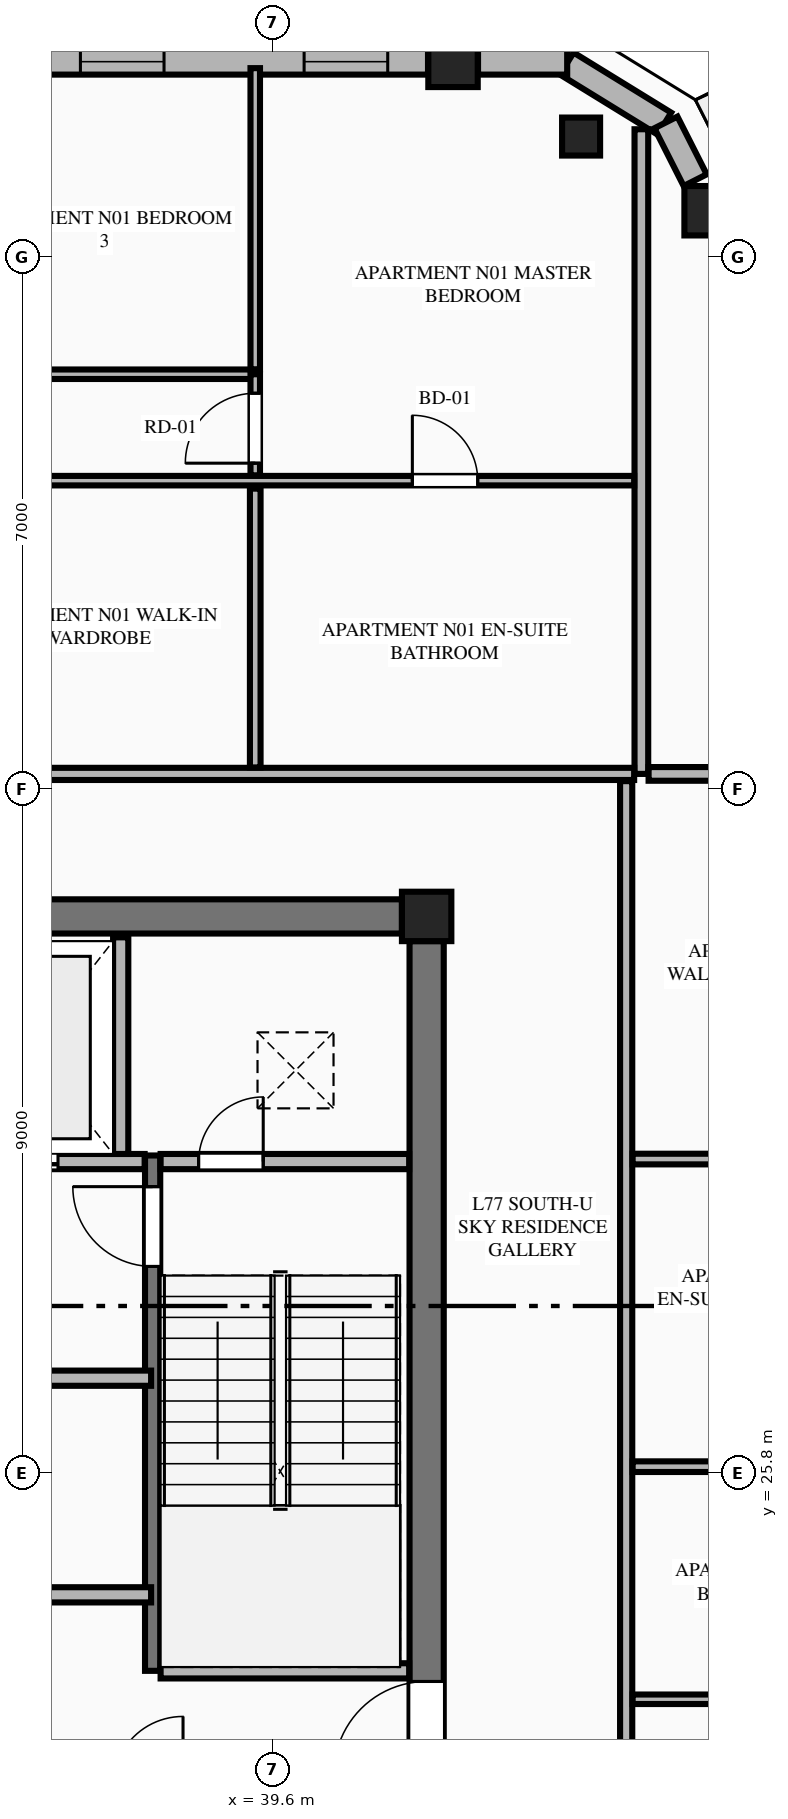
"""IFC4 building model, lengths in metres.
Left out: names, types, materials, properties, quantities, classifications, styles, units other than length and angle.
Written with IfcOpenShell. Run it as: python <this file> out.ifc"""

import sys

from ifc_helpers import new_model, si_unit, direction, frame, frame_2d, origin, origin_2d, place, context, subcontext, project, spatial, rectangle, extrude, element, fill, save


model = new_model("IFC4")
c1 = context("Model", 3, precision=1e-05, world=origin(), true_north=direction((0.0, 1.0)))
c2 = subcontext(c1, "Body", "Model", "MODEL_VIEW")
j1 = project(units=[si_unit("LENGTHUNIT", "METRE"), si_unit("PLANEANGLEUNIT", "RADIAN")], contexts=[c1])
p1 = place(None, origin())
s1 = spatial("IfcSite", under=j1, at=p1, CompositionType="ELEMENT")
p2 = place(p1, origin())
s2 = spatial("IfcBuilding", under=s1, at=p2, CompositionType="ELEMENT")
p3 = place(p2, frame((0.0, 0.0, 291.5)))
s3 = spatial("IfcBuildingStorey", under=s2, at=p3, CompositionType="ELEMENT", Elevation=291.5)
p4 = place(p3, frame((41.625, 33.125, 0.0), z_axis=(0.0, 0.0, 1.0), x_axis=(1.0, 0.0, 0.0)))
e1 = element("IfcColumn", 1, at=p4, inside=s3, PredefinedType="COLUMN", context=c2, shape_type="SweptSolid", body=[
    extrude(rectangle(XDim=0.65, YDim=0.65, at=origin_2d()), origin(), (0.0, 0.0, 1.0), 4.0),
])
p5 = place(p3, frame((23.5, 33.125, 0.0), z_axis=(0.0, 0.0, 1.0), x_axis=(1.0, 0.0, 0.0)))
e2 = element("IfcWall", 2, at=p5, inside=s3, PredefinedType="SHEAR", context=c2, shape_type="SweptSolid", body=[
    extrude(rectangle(XDim=17.8, YDim=0.45, at=frame_2d((8.9, 0.0))), origin(), (0.0, 0.0, 1.0), 3.8),
])
p6 = place(p3, frame((41.625, 19.0, 0.0), z_axis=(0.0, 0.0, 1.0), x_axis=(0.0, 1.0, 0.0)))
e3 = element("IfcWall", 3, at=p6, inside=s3, PredefinedType="SHEAR", context=c2, shape_type="SweptSolid", body=[
    extrude(rectangle(XDim=13.8, YDim=0.45, at=frame_2d((6.9, 0.0))), origin(), (0.0, 0.0, 1.0), 3.8),
])
p7 = place(p6, frame((2.84, 0.0, 0.0)))
e4 = element("IfcOpeningElement", 4, at=p7, cuts=e3, PredefinedType="OPENING", context=c2, shape_type="SweptSolid", body=[
    extrude(rectangle(XDim=1.22, YDim=2.25, at=frame_2d((0.61, 1.125))), frame((0.0, 0.235, 0.0), z_axis=(0.0, -1.0, 0.0), x_axis=(1.0, 0.0, 0.0)), (0.0, 0.0, 1.0), 0.47),
])
for number, where, z_axis, x_axis in (
    (5, (45.341, 42.409, 0.0), (0.0, 0.0, 1.0), (1.0, 0.0, 0.0)),
    (6, (41.972, 44.361, 0.0), (0.0, 0.0, 1.0), (1.0, 0.0, 0.0)),
):
    element("IfcColumn", number, at=place(p3, frame(where, z_axis=z_axis, x_axis=x_axis)), inside=s3, PredefinedType="COLUMN", context=c2, shape_type="SweptSolid", body=[
        extrude(rectangle(XDim=0.65, YDim=0.65, at=origin_2d()), origin(), (0.0, 0.0, 1.0), 4.0),
    ])
p8 = place(p3, frame((43.657, 43.385, 0.0), z_axis=(0.0, 0.0, 1.0), x_axis=(-0.865256437757, 0.501329529272, 0.0)))
e7 = element("IfcColumn", 7, at=p8, inside=s3, PredefinedType="PILASTER", context=c2, shape_type="SweptSolid", body=[
    extrude(rectangle(XDim=0.5, YDim=0.35, at=origin_2d()), origin(), (0.0, 0.0, 1.0), 4.0),
])
p9 = place(p3, frame((38.02, 23.2, 0.0), z_axis=(0.0, 0.0, 1.0), x_axis=(0.0, 1.0, 0.0)))
e8 = element("IfcWall", 8, at=p9, inside=s3, PredefinedType="SHEAR", context=c2, shape_type="SweptSolid", body=[
    extrude(rectangle(XDim=6.78, YDim=0.2, at=frame_2d((3.39, 0.0))), origin(), (0.0, 0.0, 1.0), 4.0),
])
p10 = place(p9, frame((5.32, 0.0, 0.0)))
e9 = element("IfcOpeningElement", 9, at=p10, cuts=e8, PredefinedType="OPENING", context=c2, shape_type="SweptSolid", body=[
    extrude(rectangle(XDim=1.05, YDim=2.15, at=frame_2d((0.525, 1.075))), frame((0.0, 0.11, 0.0), z_axis=(0.0, -1.0, 0.0), x_axis=(1.0, 0.0, 0.0)), (0.0, 0.0, 1.0), 0.22),
])
p11 = place(p3, frame((38.125, 23.2, 0.0), z_axis=(0.0, 0.0, 1.0), x_axis=(1.0, 0.0, 0.0)))
e10 = element("IfcWall", 10, at=p11, inside=s3, PredefinedType="PLUMBINGWALL", context=c2, shape_type="SweptSolid", body=[
    extrude(rectangle(XDim=3.27, YDim=0.2, at=frame_2d((1.635, 0.0))), origin(), (0.0, 0.0, 1.0), 3.8),
])
p12 = place(p3, frame((34.9, 29.9, 0.0), z_axis=(0.0, 0.0, 1.0), x_axis=(1.0, 0.0, 0.0)))
e11 = element("IfcWall", 11, at=p12, inside=s3, PredefinedType="PLUMBINGWALL", context=c2, shape_type="SweptSolid", body=[
    extrude(rectangle(XDim=3.015, YDim=0.2, at=frame_2d((1.508, 0.0))), origin(), (0.0, 0.0, 1.0), 3.8),
])
p13 = place(p12, frame((0.725, 0.0, 0.0)))
e12 = element("IfcOpeningElement", 12, at=p13, cuts=e11, PredefinedType="OPENING", context=c2, shape_type="SweptSolid", body=[
    extrude(rectangle(XDim=1.15, YDim=2.2, at=frame_2d((0.575, 1.1))), frame((0.0, 0.11, 0.0), z_axis=(0.0, -1.0, 0.0), x_axis=(1.0, 0.0, 0.0)), (0.0, 0.0, 1.0), 0.22),
])
p14 = place(p3, frame((38.125, 29.9, 0.0), z_axis=(0.0, 0.0, 1.0), x_axis=(1.0, 0.0, 0.0)))
e13 = element("IfcWall", 13, at=p14, inside=s3, PredefinedType="PLUMBINGWALL", context=c2, shape_type="SweptSolid", body=[
    extrude(rectangle(XDim=3.27, YDim=0.2, at=frame_2d((1.635, 0.0))), origin(), (0.0, 0.0, 1.0), 3.8),
])
p15 = place(p14, frame((0.5, 0.0, 0.0)))
e14 = element("IfcOpeningElement", 14, at=p15, cuts=e13, PredefinedType="OPENING", context=c2, shape_type="SweptSolid", body=[
    extrude(rectangle(XDim=0.85, YDim=2.05, at=frame_2d((0.425, 1.025))), frame((0.0, 0.11, 0.0), z_axis=(0.0, -1.0, 0.0), x_axis=(1.0, 0.0, 0.0)), (0.0, 0.0, 1.0), 0.22),
])
p16 = place(p3, frame((37.6, 30.0, 0.0), z_axis=(0.0, 0.0, 1.0), x_axis=(0.0, 1.0, 0.0)))
e15 = element("IfcWall", 15, at=p16, inside=s3, PredefinedType="PLUMBINGWALL", context=c2, shape_type="SweptSolid", body=[
    extrude(rectangle(XDim=2.85, YDim=0.2, at=frame_2d((1.425, 0.0))), origin(), (0.0, 0.0, 1.0), 3.8),
])
p17 = place(p3, frame((34.8, 27.05, 0.0), z_axis=(0.0, 0.0, 1.0), x_axis=(1.0, 0.0, 0.0)))
e16 = element("IfcWall", 16, at=p17, inside=s3, PredefinedType="PLUMBINGWALL", context=c2, shape_type="SweptSolid", body=[
    extrude(rectangle(XDim=3.2, YDim=0.2, at=frame_2d((1.6, 0.0))), origin(), (0.0, 0.0, 1.0), 3.8),
])
p18 = place(p3, frame((31.2, 24.2, 0.0), z_axis=(0.0, 0.0, 1.0), x_axis=(1.0, 0.0, 0.0)))
e17 = element("IfcWall", 17, at=p18, inside=s3, PredefinedType="PLUMBINGWALL", context=c2, shape_type="SweptSolid", body=[
    extrude(rectangle(XDim=6.8, YDim=0.2, at=frame_2d((3.4, 0.0))), origin(), (0.0, 0.0, 1.0), 3.8),
])
p19 = place(p18, frame((0.65, 0.0, 0.0)))
e18 = element("IfcOpeningElement", 18, at=p19, cuts=e17, PredefinedType="OPENING", context=c2, shape_type="SweptSolid", body=[
    extrude(rectangle(XDim=1.1, YDim=2.2, at=frame_2d((0.55, 1.1))), frame((0.0, 0.11, 0.0), z_axis=(0.0, -1.0, 0.0), x_axis=(1.0, 0.0, 0.0)), (0.0, 0.0, 1.0), 0.22),
])
p20 = place(p18, frame((3.8, 0.0, 0.0)))
e19 = element("IfcOpeningElement", 19, at=p20, cuts=e17, PredefinedType="OPENING", context=c2, shape_type="SweptSolid", body=[
    extrude(rectangle(XDim=0.92, YDim=2.15, at=frame_2d((0.46, 1.075))), frame((0.0, 0.11, 0.0), z_axis=(0.0, -1.0, 0.0), x_axis=(1.0, 0.0, 0.0)), (0.0, 0.0, 1.0), 0.22),
])
p21 = place(p3, frame((44.753, 43.555, 0.0), z_axis=(0.0, 0.0, 1.0), x_axis=(-0.851680557619, 0.52406128246, 0.0)))
e20 = element("IfcWall", 20, at=p21, inside=s3, PredefinedType="STANDARD", context=c2, shape_type="SweptSolid", body=[
    extrude(rectangle(XDim=1.508, YDim=0.34, at=frame_2d((0.754, 0.0))), origin(), (0.0, 0.0, 1.0), 3.8),
])
p22 = place(p3, frame((45.158, 42.811, 0.0), z_axis=(0.0, 0.0, 1.0), x_axis=(-0.451907025977, 0.8920650424, 0.0)))
e21 = element("IfcWall", 21, at=p22, inside=s3, PredefinedType="STANDARD", context=c2, shape_type="SweptSolid", body=[
    extrude(rectangle(XDim=0.852, YDim=0.34, at=frame_2d((0.426, 0.0))), origin(), (0.0, 0.0, 1.0), 3.8),
])
p23 = place(p3, frame((43.474, 44.37, 0.0), z_axis=(0.0, 0.0, 1.0), x_axis=(-1.0, 0.0, 0.0)))
e22 = element("IfcWall", 22, at=p23, inside=s3, PredefinedType="STANDARD", context=c2, shape_type="SweptSolid", body=[
    extrude(rectangle(XDim=1.173, YDim=0.34, at=frame_2d((0.586, 0.0))), origin(), (0.0, 0.0, 1.0), 3.8),
])
p24 = place(p3, frame((41.643, 44.37, 0.0), z_axis=(0.0, 0.0, 1.0), x_axis=(-1.0, 0.0, 0.0)))
e23 = element("IfcWall", 23, at=p24, inside=s3, PredefinedType="STANDARD", context=c2, shape_type="SweptSolid", body=[
    extrude(rectangle(XDim=5.66, YDim=0.34, at=frame_2d((2.83, 0.0))), origin(), (0.0, 0.0, 1.0), 2.99),
])
p25 = place(p24, frame((0.53, 0.0, 0.75)))
e24 = element("IfcOpeningElement", 24, at=p25, cuts=e23, PredefinedType="OPENING", context=c2, shape_type="SweptSolid", body=[
    extrude(rectangle(XDim=1.1, YDim=2.0, at=frame_2d((0.55, 1.0))), frame((0.0, 0.18, 0.0), z_axis=(0.0, -1.0, 0.0), x_axis=(1.0, 0.0, 0.0)), (0.0, 0.0, 1.0), 0.36),
])
p26 = place(p24, frame((3.473, 0.0, 0.75)))
e25 = element("IfcOpeningElement", 25, at=p26, cuts=e23, PredefinedType="OPENING", context=c2, shape_type="SweptSolid", body=[
    extrude(rectangle(XDim=1.1, YDim=2.0, at=frame_2d((0.55, 1.0))), frame((0.0, 0.18, 0.0), z_axis=(0.0, -1.0, 0.0), x_axis=(1.0, 0.0, 0.0)), (0.0, 0.0, 1.0), 0.36),
])
p27 = place(p3, frame((44.45, 35.0, 0.0), z_axis=(0.0, 0.0, 1.0), x_axis=(0.0, 1.0, 0.0)))
e26 = element("IfcWall", 26, at=p27, inside=s3, PredefinedType="PARTITIONING", context=c2, shape_type="SweptSolid", body=[
    extrude(rectangle(XDim=8.481, YDim=0.18, at=frame_2d((4.24, 0.0))), origin(), (0.0, 0.0, 1.0), 3.8),
])
p28 = place(p3, frame((20.445, 35.0, 0.0), z_axis=(0.0, 0.0, 1.0), x_axis=(1.0, 0.0, 0.0)))
e27 = element("IfcWall", 27, at=p28, inside=s3, PredefinedType="PARTITIONING", context=c2, shape_type="SweptSolid", body=[
    extrude(rectangle(XDim=23.91, YDim=0.16, at=frame_2d((11.955, 0.0))), origin(), (0.0, 0.0, 1.0), 3.8),
])
p29 = place(p28, frame((0.405, 0.0, 0.0)))
e28 = element("IfcOpeningElement", 28, at=p29, cuts=e27, PredefinedType="OPENING", context=c2, shape_type="SweptSolid", body=[
    extrude(rectangle(XDim=1.35, YDim=2.35, at=frame_2d((0.675, 1.175))), frame((0.0, 0.09, 0.0), z_axis=(0.0, -1.0, 0.0), x_axis=(1.0, 0.0, 0.0)), (0.0, 0.0, 1.0), 0.18),
])
p30 = place(p3, frame((34.588, 38.858, 0.0), z_axis=(0.0, 0.0, 1.0), x_axis=(1.0, 0.0, 0.0)))
e29 = element("IfcWall", 29, at=p30, inside=s3, PredefinedType="PARTITIONING", context=c2, shape_type="SweptSolid", body=[
    extrude(rectangle(XDim=9.767, YDim=0.125, at=frame_2d((4.884, 0.0))), origin(), (0.0, 0.0, 1.0), 3.8),
])
p31 = place(p30, frame((6.849, 0.0, 0.0)))
e30 = element("IfcOpeningElement", 30, at=p31, cuts=e29, PredefinedType="OPENING", context=c2, shape_type="SweptSolid", body=[
    extrude(rectangle(XDim=0.86, YDim=2.1, at=frame_2d((0.43, 1.05))), frame((0.0, 0.073, 0.0), z_axis=(0.0, -1.0, 0.0), x_axis=(1.0, 0.0, 0.0)), (0.0, 0.0, 1.0), 0.145),
])
p32 = place(p30, frame((0.3, 0.0, 0.0)))
e31 = element("IfcOpeningElement", 31, at=p32, cuts=e29, PredefinedType="OPENING", context=c2, shape_type="SweptSolid", body=[
    extrude(rectangle(XDim=0.88, YDim=2.15, at=frame_2d((0.44, 1.075))), frame((0.0, 0.073, 0.0), z_axis=(0.0, -1.0, 0.0), x_axis=(1.0, 0.0, 0.0)), (0.0, 0.0, 1.0), 0.145),
])
p33 = place(p3, frame((29.508, 40.258, 0.0), z_axis=(0.0, 0.0, 1.0), x_axis=(1.0, 0.0, 0.0)))
e32 = element("IfcWall", 32, at=p33, inside=s3, PredefinedType="PARTITIONING", context=c2, shape_type="SweptSolid", body=[
    extrude(rectangle(XDim=9.862, YDim=0.125, at=frame_2d((4.931, 0.0))), origin(), (0.0, 0.0, 1.0), 3.487),
])
p34 = place(p33, frame((0.35, 0.0, 0.0)))
e33 = element("IfcOpeningElement", 33, at=p34, cuts=e32, PredefinedType="OPENING", context=c2, shape_type="SweptSolid", body=[
    extrude(rectangle(XDim=0.92, YDim=2.15, at=frame_2d((0.46, 1.075))), frame((0.0, 0.073, 0.0), z_axis=(0.0, -1.0, 0.0), x_axis=(1.0, 0.0, 0.0)), (0.0, 0.0, 1.0), 0.145),
])
p35 = place(p33, frame((5.43, 0.0, 0.0)))
e34 = element("IfcOpeningElement", 34, at=p35, cuts=e32, PredefinedType="OPENING", context=c2, shape_type="SweptSolid", body=[
    extrude(rectangle(XDim=0.92, YDim=2.15, at=frame_2d((0.46, 1.075))), frame((0.0, 0.073, 0.0), z_axis=(0.0, -1.0, 0.0), x_axis=(1.0, 0.0, 0.0)), (0.0, 0.0, 1.0), 0.145),
])
p36 = place(p3, frame((39.37, 38.928, 0.0), z_axis=(0.0, 0.0, 1.0), x_axis=(0.0, 1.0, 0.0)))
e35 = element("IfcWall", 35, at=p36, inside=s3, PredefinedType="PARTITIONING", context=c2, shape_type="SweptSolid", body=[
    extrude(rectangle(XDim=1.33, YDim=0.125, at=frame_2d((0.665, 0.0))), origin(), (0.0, 0.0, 1.0), 3.8),
])
p37 = place(p36, frame((0.16, 0.0, 0.0)))
e36 = element("IfcOpeningElement", 36, at=p37, cuts=e35, PredefinedType="OPENING", context=c2, shape_type="SweptSolid", body=[
    extrude(rectangle(XDim=0.92, YDim=2.15, at=frame_2d((0.46, 1.075))), frame((0.0, 0.073, 0.0), z_axis=(0.0, -1.0, 0.0), x_axis=(1.0, 0.0, 0.0)), (0.0, 0.0, 1.0), 0.145),
])
p38 = place(p3, frame((39.37, 40.323, 0.0), z_axis=(0.0, 0.0, 1.0), x_axis=(0.0, 1.0, 0.0)))
e37 = element("IfcWall", 37, at=p38, inside=s3, PredefinedType="PARTITIONING", context=c2, shape_type="SweptSolid", body=[
    extrude(rectangle(XDim=3.962, YDim=0.125, at=frame_2d((1.981, 0.0))), origin(), (0.0, 0.0, 1.0), 3.8),
])
p39 = place(p3, frame((39.37, 35.085, 0.0), z_axis=(0.0, 0.0, 1.0), x_axis=(0.0, 1.0, 0.0)))
e38 = element("IfcWall", 38, at=p39, inside=s3, PredefinedType="PLUMBINGWALL", context=c2, shape_type="SweptSolid", body=[
    extrude(rectangle(XDim=3.668, YDim=0.14, at=frame_2d((1.834, 0.0))), origin(), (0.0, 0.0, 1.0), 3.8),
])
p40 = place(p3, frame((44.545, 35.0, 0.0), z_axis=(0.0, 0.0, 1.0), x_axis=(1.0, 0.0, 0.0)))
e39 = element("IfcWall", 39, at=p40, inside=s3, PredefinedType="PARTITIONING", context=c2, shape_type="SweptSolid", body=[
    extrude(rectangle(XDim=4.322, YDim=0.18, at=frame_2d((2.161, 0.0))), origin(), (0.0, 0.0, 1.0), 3.8),
])
p41 = place(p3, frame((44.25, 16.495, 0.0), z_axis=(0.0, 0.0, 1.0), x_axis=(0.0, 1.0, 0.0)))
e40 = element("IfcWall", 40, at=p41, inside=s3, PredefinedType="PARTITIONING", context=c2, shape_type="SweptSolid", body=[
    extrude(rectangle(XDim=18.41, YDim=0.16, at=frame_2d((9.205, 0.0))), origin(), (0.0, 0.0, 1.0), 3.487),
])
p42 = place(p41, frame((0.45, 0.0, 0.0)))
e41 = element("IfcOpeningElement", 41, at=p42, cuts=e40, PredefinedType="OPENING", context=c2, shape_type="SweptSolid", body=[
    extrude(rectangle(XDim=1.02, YDim=2.25, at=frame_2d((0.51, 1.125))), frame((0.0, 0.09, 0.0), z_axis=(0.0, -1.0, 0.0), x_axis=(1.0, 0.0, 0.0)), (0.0, 0.0, 1.0), 0.18),
])
p43 = place(p3, frame((44.335, 25.886, 0.0), z_axis=(0.0, 0.0, 1.0), x_axis=(1.0, 0.0, 0.0)))
e42 = element("IfcWall", 42, at=p43, inside=s3, PredefinedType="PLUMBINGWALL", context=c2, shape_type="SweptSolid", body=[
    extrude(rectangle(XDim=3.48, YDim=0.14, at=frame_2d((1.74, 0.0))), origin(), (0.0, 0.0, 1.0), 3.8),
])
p44 = place(p3, frame((44.335, 22.826, 0.0), z_axis=(0.0, 0.0, 1.0), x_axis=(1.0, 0.0, 0.0)))
e43 = element("IfcWall", 43, at=p44, inside=s3, PredefinedType="PARTITIONING", context=c2, shape_type="SweptSolid", body=[
    extrude(rectangle(XDim=3.48, YDim=0.125, at=frame_2d((1.74, 0.0))), origin(), (0.0, 0.0, 1.0), 3.8),
])
p45 = place(p3, frame((44.335, 29.933, 0.0), z_axis=(0.0, 0.0, 1.0), x_axis=(1.0, 0.0, 0.0)))
e44 = element("IfcWall", 44, at=p45, inside=s3, PredefinedType="PLUMBINGWALL", context=c2, shape_type="SweptSolid", body=[
    extrude(rectangle(XDim=3.48, YDim=0.14, at=frame_2d((1.74, 0.0))), origin(), (0.0, 0.0, 1.0), 3.8),
])
p46 = place(p7, origin())
e45 = element("IfcDoor", 45, at=p46, inside=s3, OperationType="SINGLE_SWING_LEFT", PredefinedType="DOOR", context=c2, shape_type="SweptSolid", body=[
    extrude(rectangle(XDim=1.22, YDim=2.25, at=frame_2d((0.61, 1.125))), frame((0.0, 0.025, 0.0), z_axis=(0.0, -1.0, 0.0), x_axis=(1.0, 0.0, 0.0)), (0.0, 0.0, 1.0), 0.05),
])
fill(e4, e45)
p47 = place(p10, origin())
e46 = element("IfcDoor", 46, at=p47, inside=s3, OperationType="SINGLE_SWING_RIGHT", PredefinedType="DOOR", context=c2, shape_type="SweptSolid", body=[
    extrude(rectangle(XDim=1.05, YDim=2.15, at=frame_2d((0.525, 1.075))), frame((0.0, 0.025, 0.0), z_axis=(0.0, -1.0, 0.0), x_axis=(1.0, 0.0, 0.0)), (0.0, 0.0, 1.0), 0.05),
])
fill(e9, e46)
p48 = place(p15, origin())
e47 = element("IfcDoor", 47, at=p48, inside=s3, OperationType="SINGLE_SWING_RIGHT", PredefinedType="DOOR", context=c2, shape_type="SweptSolid", body=[
    extrude(rectangle(XDim=0.85, YDim=2.05, at=frame_2d((0.425, 1.025))), frame((0.0, 0.025, 0.0), z_axis=(0.0, -1.0, 0.0), x_axis=(1.0, 0.0, 0.0)), (0.0, 0.0, 1.0), 0.05),
])
fill(e14, e47)
p49 = place(p13, origin())
e48 = element("IfcDoor", 48, at=p49, inside=s3, OperationType="DOUBLE_DOOR_SLIDING", PredefinedType="DOOR", context=c2, shape_type="SweptSolid", body=[
    extrude(rectangle(XDim=1.15, YDim=2.2, at=frame_2d((0.575, 1.1))), frame((0.0, 0.025, 0.0), z_axis=(0.0, -1.0, 0.0), x_axis=(1.0, 0.0, 0.0)), (0.0, 0.0, 1.0), 0.05),
])
fill(e12, e48)
p50 = place(p25, origin())
e49 = element("IfcWindow", 49, at=p50, inside=s3, PartitioningType="SINGLE_PANEL", PredefinedType="WINDOW", context=c2, shape_type="SweptSolid", body=[
    extrude(rectangle(XDim=1.1, YDim=2.0, at=frame_2d((0.55, 1.0))), frame((0.0, 0.03, 0.0), z_axis=(0.0, -1.0, 0.0), x_axis=(1.0, 0.0, 0.0)), (0.0, 0.0, 1.0), 0.06),
])
fill(e24, e49)
p51 = place(p31, origin())
e50 = element("IfcDoor", 50, at=p51, inside=s3, OperationType="SINGLE_SWING_LEFT", PredefinedType="DOOR", context=c2, shape_type="SweptSolid", body=[
    extrude(rectangle(XDim=0.86, YDim=2.1, at=frame_2d((0.43, 1.05))), frame((0.0, 0.025, 0.0), z_axis=(0.0, -1.0, 0.0), x_axis=(1.0, 0.0, 0.0)), (0.0, 0.0, 1.0), 0.05),
])
fill(e30, e50)
p52 = place(p37, origin())
e51 = element("IfcDoor", 51, at=p52, inside=s3, OperationType="SINGLE_SWING_LEFT", PredefinedType="DOOR", context=c2, shape_type="SweptSolid", body=[
    extrude(rectangle(XDim=0.92, YDim=2.15, at=frame_2d((0.46, 1.075))), frame((0.0, 0.025, 0.0), z_axis=(0.0, -1.0, 0.0), x_axis=(1.0, 0.0, 0.0)), (0.0, 0.0, 1.0), 0.05),
])
fill(e36, e51)
p53 = place(p26, origin())
e52 = element("IfcWindow", 52, at=p53, inside=s3, PartitioningType="SINGLE_PANEL", PredefinedType="WINDOW", context=c2, shape_type="SweptSolid", body=[
    extrude(rectangle(XDim=1.1, YDim=2.0, at=frame_2d((0.55, 1.0))), frame((0.0, 0.03, 0.0), z_axis=(0.0, -1.0, 0.0), x_axis=(1.0, 0.0, 0.0)), (0.0, 0.0, 1.0), 0.06),
])
fill(e25, e52)
save(model, sys.argv[1])
